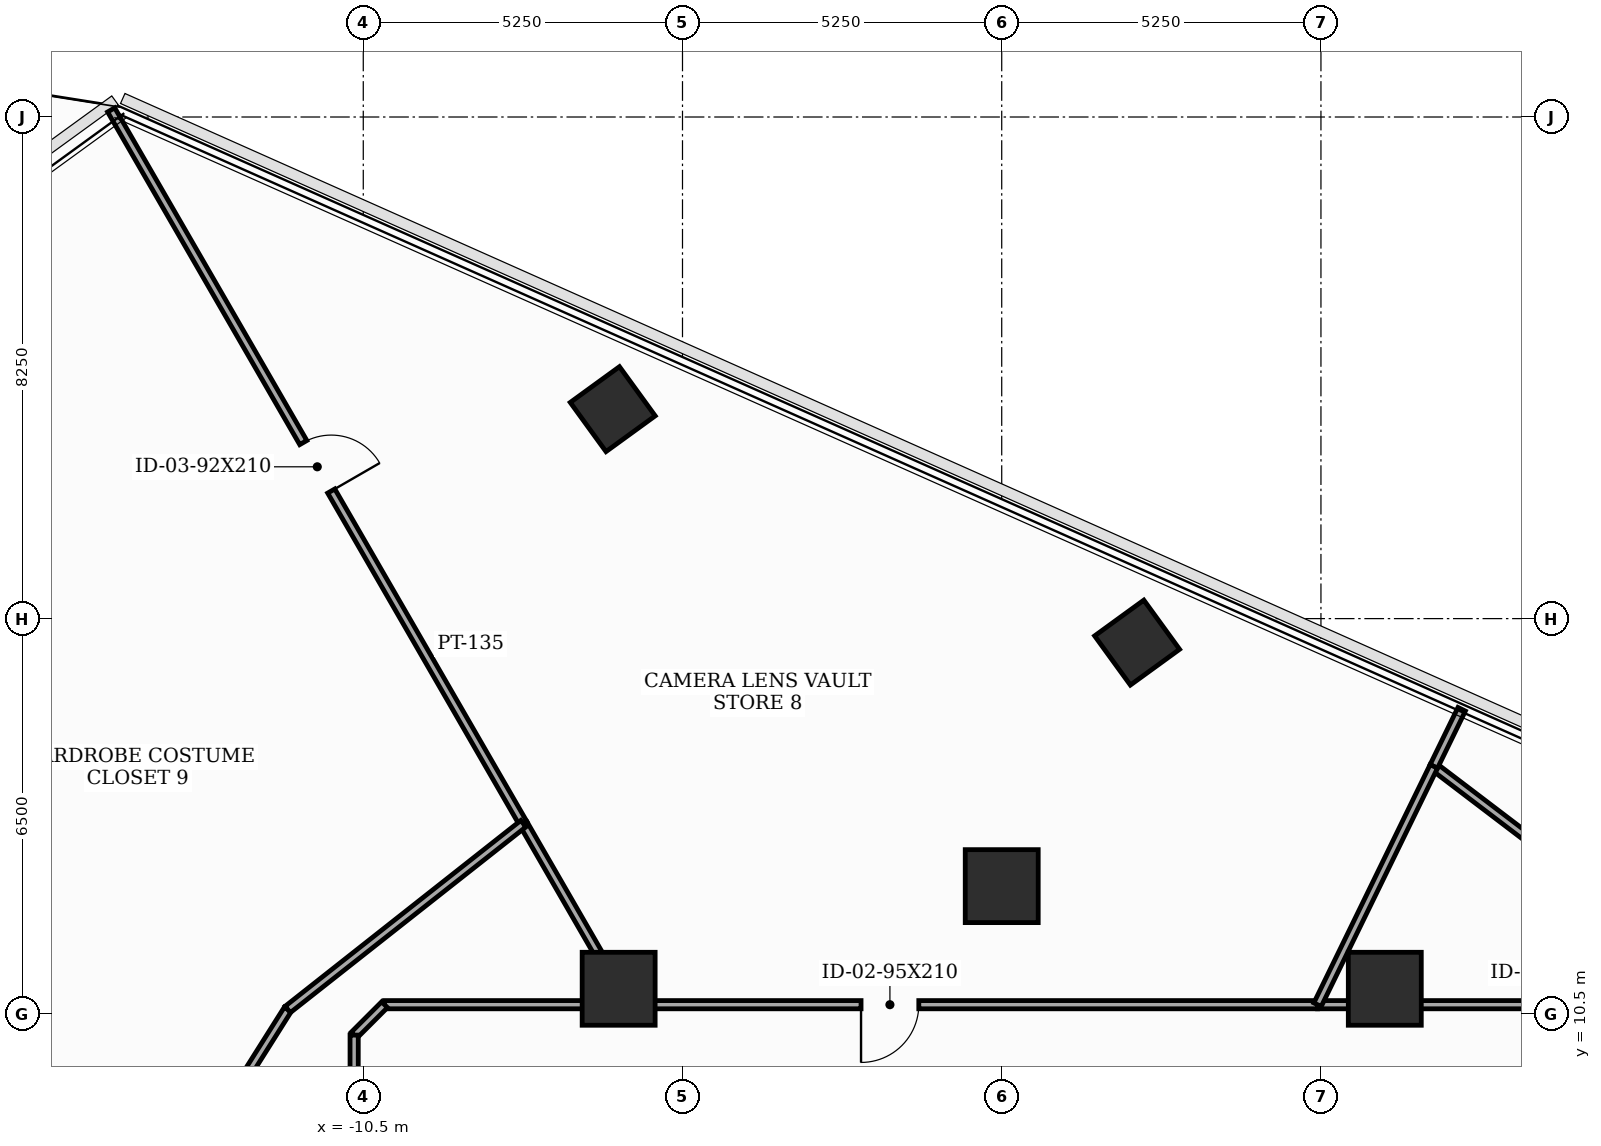
"""IFC4 building model, lengths in metres.
Left out: names, types, materials, properties, quantities, classifications, styles, units other than length and angle.
Written with IfcOpenShell. Run it as: python <this file> out.ifc"""

import sys

from ifc_helpers import new_model, si_unit, direction, frame, frame_2d, origin, origin_2d, place, context, subcontext, project, spatial, rectangle, extrude, element, fill, save


model = new_model("IFC4")
c1 = context("Model", 3, precision=1e-05, world=origin(), true_north=direction((0.0, 1.0)))
c2 = subcontext(c1, "Body", "Model", "MODEL_VIEW")
j1 = project(units=[si_unit("LENGTHUNIT", "METRE"), si_unit("PLANEANGLEUNIT", "RADIAN")], contexts=[c1])
p1 = place(None, origin())
s1 = spatial("IfcSite", under=j1, at=p1, CompositionType="ELEMENT")
p2 = place(p1, origin())
s2 = spatial("IfcBuilding", under=s1, at=p2, CompositionType="ELEMENT")
p3 = place(p2, frame((0.0, 0.0, 158.3)))
s3 = spatial("IfcBuildingStorey", under=s2, at=p3, CompositionType="ELEMENT", Elevation=158.3)
for number, where, z_axis, x_axis in (
    (1, (6.3, 10.912, 0.0), (0.0, 0.0, 1.0), (1.0, 0.0, 0.0)),
    (2, (0.0, 12.6, 0.0), (0.0, 0.0, 1.0), (1.0, 0.0, 0.0)),
    (3, (-6.3, 10.912, 0.0), (0.0, 0.0, 1.0), (1.0, 0.0, 0.0)),
):
    element("IfcColumn", number, at=place(p3, frame(where, z_axis=z_axis, x_axis=x_axis)), inside=s3, PredefinedType="COLUMN", context=c2, shape_type="SweptSolid", body=[
        extrude(rectangle(XDim=1.2, YDim=1.2, at=origin_2d()), origin(), (0.0, 0.0, 1.0), 3.7),
    ])
for number, where, z_axis, x_axis in (
    (4, (2.227, 16.605, 0.0), (0.0, 0.0, 1.0), (0.809, 0.588, 0.0)),
    (5, (-6.397, 20.445, 0.0), (0.0, 0.0, 1.0), (0.809, 0.588, 0.0)),
):
    element("IfcColumn", number, at=place(p3, frame(where, z_axis=z_axis, x_axis=x_axis)), inside=s3, PredefinedType="COLUMN", context=c2, shape_type="SweptSolid", body=[
        extrude(rectangle(XDim=1.0, YDim=1.0, at=origin_2d()), origin(), (0.0, 0.0, 1.0), 3.7),
    ])
p4 = place(p3, frame((10.15, 10.65, 0.0), z_axis=(0.0, 0.0, 1.0), x_axis=(-1.0, 0.0, 0.0)))
e6 = element("IfcWall", 6, at=p4, inside=s3, PredefinedType="PARTITIONING", context=c2, shape_type="SweptSolid", body=[
    extrude(rectangle(XDim=4.956, YDim=0.135, at=frame_2d((2.478, 0.0))), origin(), (0.0, 0.0, 1.0), 2.885),
])
p5 = place(p4, frame((0.516, 0.0, 0.0)))
e7 = element("IfcOpeningElement", 7, at=p5, cuts=e6, PredefinedType="OPENING", context=c2, shape_type="SweptSolid", body=[
    extrude(rectangle(XDim=0.95, YDim=2.1, at=frame_2d((0.475, 1.05))), frame((0.0, 0.077, 0.0), z_axis=(0.0, -1.0, 0.0), x_axis=(1.0, 0.0, 0.0)), (0.0, 0.0, 1.0), 0.155),
])
p6 = place(p3, frame((5.194, 10.65, 0.0), z_axis=(0.0, 0.0, 1.0), x_axis=(-1.0, 0.0, 0.0)))
e8 = element("IfcWall", 8, at=p6, inside=s3, PredefinedType="PARTITIONING", context=c2, shape_type="SweptSolid", body=[
    extrude(rectangle(XDim=11.343, YDim=0.135, at=frame_2d((5.671, 0.0))), origin(), (0.0, 0.0, 1.0), 2.885),
])
p7 = place(p6, frame((6.558, 0.0, 0.0)))
e9 = element("IfcOpeningElement", 9, at=p7, cuts=e8, PredefinedType="OPENING", context=c2, shape_type="SweptSolid", body=[
    extrude(rectangle(XDim=0.95, YDim=2.1, at=frame_2d((0.475, 1.05))), frame((0.0, 0.077, 0.0), z_axis=(0.0, -1.0, 0.0), x_axis=(1.0, 0.0, 0.0)), (0.0, 0.0, 1.0), 0.155),
])
p8 = place(p3, frame((-6.149, 10.65, 0.0), z_axis=(0.0, 0.0, 1.0), x_axis=(-1.0, 0.0, 0.0)))
e10 = element("IfcWall", 10, at=p8, inside=s3, PredefinedType="PARTITIONING", context=c2, shape_type="SweptSolid", body=[
    extrude(rectangle(XDim=4.001, YDim=0.135, at=frame_2d((2.0, 0.0))), origin(), (0.0, 0.0, 1.0), 2.885),
])
p9 = place(p3, frame((-10.15, 10.65, 0.0), z_axis=(0.0, 0.0, 1.0), x_axis=(-0.707106781187, -0.707106781187, 0.0)))
e11 = element("IfcWall", 11, at=p9, inside=s3, PredefinedType="PARTITIONING", context=c2, shape_type="SweptSolid", body=[
    extrude(rectangle(XDim=0.707, YDim=0.135, at=frame_2d((0.354, 0.0))), origin(), (0.0, 0.0, 1.0), 3.5),
])
p10 = place(p3, frame((-10.65, 10.15, 0.0), z_axis=(0.0, 0.0, 1.0), x_axis=(0.0, -1.0, 0.0)))
e12 = element("IfcWall", 12, at=p10, inside=s3, PredefinedType="PARTITIONING", context=c2, shape_type="SweptSolid", body=[
    extrude(rectangle(XDim=5.408, YDim=0.135, at=frame_2d((2.704, 0.0))), origin(), (0.0, 0.0, 1.0), 2.885),
])
p11 = place(p10, frame((0.607, 0.0, 0.0)))
e13 = element("IfcOpeningElement", 13, at=p11, cuts=e12, PredefinedType="OPENING", context=c2, shape_type="SweptSolid", body=[
    extrude(rectangle(XDim=0.95, YDim=2.1, at=frame_2d((0.475, 1.05))), frame((0.0, 0.077, 0.0), z_axis=(0.0, -1.0, 0.0), x_axis=(1.0, 0.0, 0.0)), (0.0, 0.0, 1.0), 0.155),
])
p12 = place(p3, frame((7.106, 14.569, 0.0), z_axis=(0.0, 0.0, 1.0), x_axis=(0.795990968219, -0.60530849863, 0.0)))
e14 = element("IfcWall", 14, at=p12, inside=s3, PredefinedType="PARTITIONING", context=c2, shape_type="SweptSolid", body=[
    extrude(rectangle(XDim=6.76, YDim=0.135, at=frame_2d((3.38, 0.0))), origin(), (0.0, 0.0, 1.0), 2.885),
])
p13 = place(p3, frame((7.564, 15.51, 0.0), z_axis=(0.0, 0.0, 1.0), x_axis=(-0.438230528202, -0.898862616951, 0.0)))
e15 = element("IfcWall", 15, at=p13, inside=s3, PredefinedType="PARTITIONING", context=c2, shape_type="SweptSolid", body=[
    extrude(rectangle(XDim=1.046, YDim=0.135, at=frame_2d((0.523, 0.0))), origin(), (0.0, 0.0, 1.0), 2.985),
])
p14 = place(p3, frame((7.106, 14.569, 0.0), z_axis=(0.0, 0.0, 1.0), x_axis=(-0.43843576568, -0.898762526684, 0.0)))
e16 = element("IfcWall", 16, at=p14, inside=s3, PredefinedType="PARTITIONING", context=c2, shape_type="SweptSolid", body=[
    extrude(rectangle(XDim=4.361, YDim=0.135, at=frame_2d((2.18, 0.0))), origin(), (0.0, 0.0, 1.0), 2.885),
])
p15 = place(p3, frame((-14.646, 25.367, 0.0), z_axis=(0.0, 0.0, 1.0), x_axis=(0.500047745944, -0.865997835896, 0.0)))
e17 = element("IfcWall", 17, at=p15, inside=s3, PredefinedType="PARTITIONING", context=c2, shape_type="SweptSolid", body=[
    extrude(rectangle(XDim=13.556, YDim=0.135, at=frame_2d((6.778, 0.0))), origin(), (0.0, 0.0, 1.0), 2.985),
])
p16 = place(p15, frame((6.318, 0.0, 0.0)))
e18 = element("IfcOpeningElement", 18, at=p16, cuts=e17, PredefinedType="OPENING", context=c2, shape_type="SweptSolid", body=[
    extrude(rectangle(XDim=0.92, YDim=2.1, at=frame_2d((0.46, 1.05))), frame((0.0, 0.077, 0.0), z_axis=(0.0, -1.0, 0.0), x_axis=(1.0, 0.0, 0.0)), (0.0, 0.0, 1.0), 0.155),
])
p17 = place(p3, frame((-7.867, 13.627, 0.0), z_axis=(0.0, 0.0, 1.0), x_axis=(0.499829032188, -0.866124089598, 0.0)))
e19 = element("IfcWall", 19, at=p17, inside=s3, PredefinedType="PARTITIONING", context=c2, shape_type="SweptSolid", body=[
    extrude(rectangle(XDim=3.437, YDim=0.135, at=frame_2d((1.719, 0.0))), origin(), (0.0, 0.0, 1.0), 2.885),
])
p18 = place(p3, frame((-14.374, 6.4, 0.0), z_axis=(0.0, 0.0, 1.0), x_axis=(0.53356651363, 0.845758106986, 0.0)))
e20 = element("IfcWall", 20, at=p18, inside=s3, PredefinedType="PARTITIONING", context=c2, shape_type="SweptSolid", body=[
    extrude(rectangle(XDim=4.933, YDim=0.135, at=frame_2d((2.467, 0.0))), origin(), (0.0, 0.0, 1.0), 2.885),
])
p19 = place(p3, frame((-11.742, 10.572, 0.0), z_axis=(0.0, 0.0, 1.0), x_axis=(0.785304323173, 0.619109941776, 0.0)))
e21 = element("IfcWall", 21, at=p19, inside=s3, PredefinedType="PARTITIONING", context=c2, shape_type="SweptSolid", body=[
    extrude(rectangle(XDim=4.934, YDim=0.135, at=frame_2d((2.467, 0.0))), origin(), (0.0, 0.0, 1.0), 3.5),
])
p20 = place(p7, origin())
e22 = element("IfcDoor", 22, at=p20, inside=s3, OperationType="SINGLE_SWING_RIGHT", PredefinedType="DOOR", context=c2, shape_type="SweptSolid", body=[
    extrude(rectangle(XDim=0.95, YDim=2.1, at=frame_2d((0.475, 1.05))), frame((0.0, 0.025, 0.0), z_axis=(0.0, -1.0, 0.0), x_axis=(1.0, 0.0, 0.0)), (0.0, 0.0, 1.0), 0.05),
])
fill(e9, e22)
p21 = place(p16, origin())
e23 = element("IfcDoor", 23, at=p21, inside=s3, OperationType="SINGLE_SWING_RIGHT", PredefinedType="DOOR", context=c2, shape_type="SweptSolid", body=[
    extrude(rectangle(XDim=0.92, YDim=2.1, at=frame_2d((0.46, 1.05))), frame((0.0, 0.025, 0.0), z_axis=(0.0, -1.0, 0.0), x_axis=(1.0, 0.0, 0.0)), (0.0, 0.0, 1.0), 0.05),
])
fill(e18, e23)
save(model, sys.argv[1])
